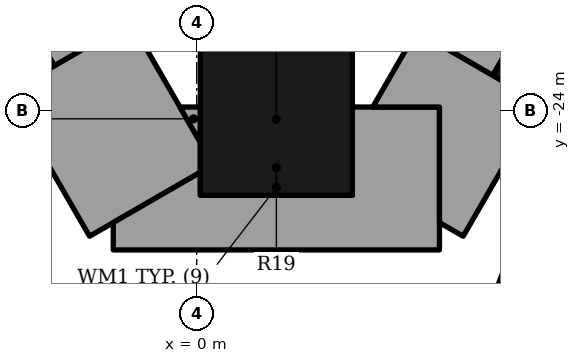
"""IFC4 building model, lengths in metres.
Left out: names, types, materials, properties, quantities, classifications, styles, units other than length and angle.
Written with IfcOpenShell. Run it as: python <this file> out.ifc"""

import sys

from ifc_helpers import new_model, si_unit, direction, frame, frame_2d, origin, origin_2d, place, context, subcontext, project, spatial, polyline, rectangle, outline, extrude, element, save


model = new_model("IFC4")
c1 = context("Model", 3, precision=1e-05, world=origin(), true_north=direction((0.0, 1.0)))
c2 = subcontext(c1, "Body", "Model", "MODEL_VIEW")
j1 = project(units=[si_unit("LENGTHUNIT", "METRE"), si_unit("PLANEANGLEUNIT", "RADIAN")], contexts=[c1])
p1 = place(None, origin())
s1 = spatial("IfcSite", under=j1, at=p1, CompositionType="ELEMENT")
p2 = place(p1, origin())
s2 = spatial("IfcBuilding", under=s1, at=p2, CompositionType="ELEMENT")
p3 = place(p2, frame((0.0, 0.0, 196.4)))
s3 = spatial("IfcBuildingStorey", under=s2, at=p3, CompositionType="ELEMENT", Elevation=196.4)
p4 = place(p3, frame((1.31, -24.142, 0.0), z_axis=(0.0, 0.0, 1.0), x_axis=(0.0, 1.0, 0.0)))
e1 = element("IfcColumn", 1, at=p4, inside=s3, PredefinedType="COLUMN", context=c2, shape_type="SweptSolid", body=[
    extrude(rectangle(XDim=2.5, YDim=2.5, at=origin_2d()), origin(), (0.0, 0.0, 1.0), 3.9),
])
for number, where, z_axis, x_axis in (
    (2, (-2.957, -23.096, 0.0), (0.0, 0.0, 1.0), (0.5, -0.866, 0.0)),
    (3, (5.486, -23.254, 0.0), (0.0, 0.0, 1.0), (0.5, 0.866, 0.0)),
):
    element("IfcColumn", number, at=place(p3, frame(where, z_axis=z_axis, x_axis=x_axis)), inside=s3, PredefinedType="COLUMN", context=c2, shape_type="SweptSolid", body=[
        extrude(rectangle(XDim=0.9, YDim=0.9, at=origin_2d()), origin(), (0.0, 0.0, 1.0), 3.9),
    ])
for number, where, z_axis, x_axis in (
    (4, (-2.492, -23.001, 0.0), (0.0, 0.0, 1.0), (0.866, 0.5, 0.0)),
    (5, (3.462, -22.259, 0.0), (0.0, 0.0, 1.0), (0.866, -0.5, 0.0)),
):
    element("IfcWall", number, at=place(p3, frame(where, z_axis=z_axis, x_axis=x_axis)), inside=s3, PredefinedType="SOLIDWALL", context=c2, shape_type="SweptSolid", body=[
        extrude(rectangle(XDim=1.8, YDim=0.6, at=frame_2d((0.9, 0.0))), origin(), (0.0, 0.0, 1.0), 3.0),
    ])
p5 = place(p3, origin())
e6 = element("IfcWall", 6, at=p5, inside=s3, PredefinedType="SOLIDWALL", context=c2, shape_type="SweptSolid", body=[
    extrude(outline(polyline([(0.06, -24.521), (-1.086, -22.535), (-3.121, -23.71), (-1.762, -26.065), (0.06, -25.013), (0.06, -24.521)])), origin(), (0.0, 0.0, 1.0), 3.0),
])
p6 = place(p3, origin())
e7 = element("IfcWall", 7, at=p6, inside=s3, PredefinedType="SOLIDWALL", context=c2, shape_type="SweptSolid", body=[
    extrude(outline(polyline([(2.56, -23.94), (2.56, -25.392), (0.06, -25.392), (0.06, -25.013), (-1.372, -25.84), (-1.372, -26.29), (3.993, -26.29), (3.993, -23.94), (2.56, -23.94)])), origin(), (0.0, 0.0, 1.0), 3.0),
])
p7 = place(p3, origin())
e8 = element("IfcWall", 8, at=p7, inside=s3, PredefinedType="SOLIDWALL", context=c2, shape_type="SweptSolid", body=[
    extrude(outline(polyline([(-0.275, -23.94), (0.06, -24.521), (0.06, -23.94), (-0.275, -23.94)])), origin(), (0.0, 0.0, 1.0), 3.0),
])
p8 = place(p3, origin())
e9 = element("IfcWall", 9, at=p8, inside=s3, PredefinedType="SOLIDWALL", context=c2, shape_type="SweptSolid", body=[
    extrude(outline(polyline([(4.871, -23.419), (3.615, -22.694), (2.896, -23.94), (3.993, -23.94), (3.993, -25.84), (4.383, -26.065), (5.651, -23.869), (4.871, -23.419), (4.871, -23.419)])), origin(), (0.0, 0.0, 1.0), 3.0),
])
save(model, sys.argv[1])
